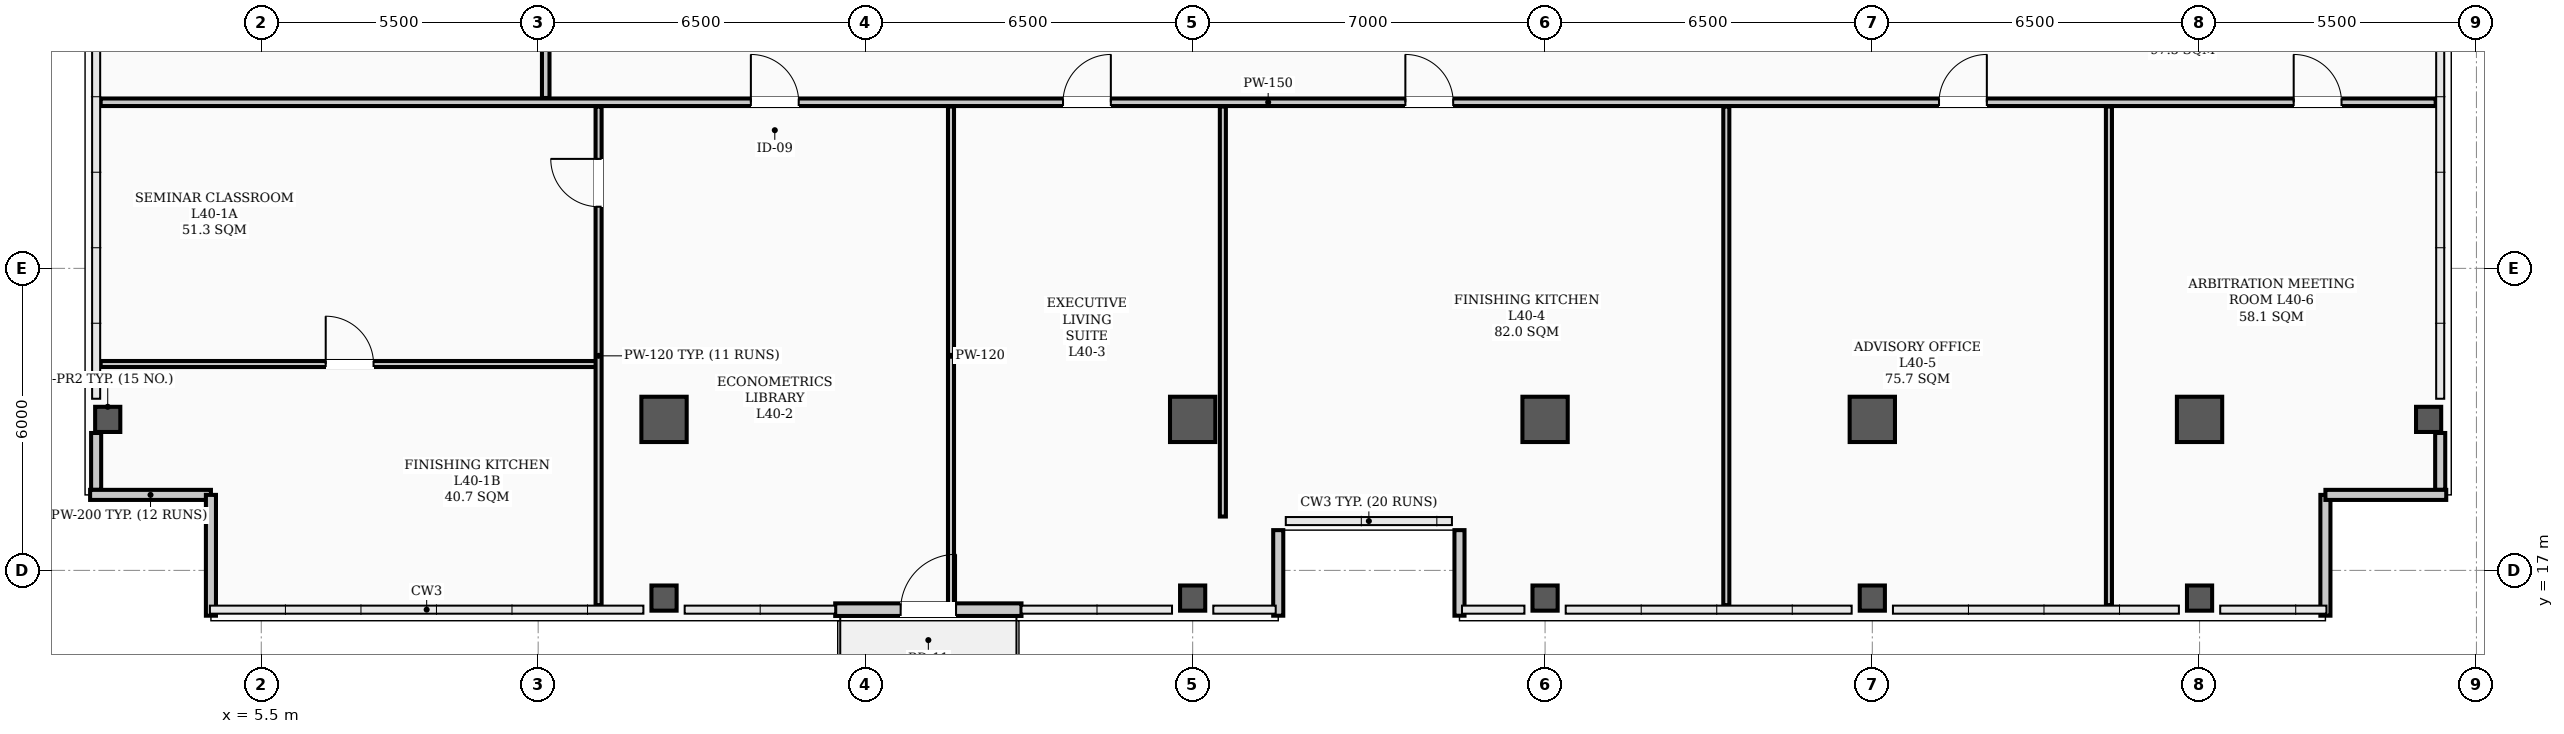
"""IFC4 building model, lengths in metres.
Left out: names, types, materials, properties, quantities, classifications, styles, units other than length and angle.
Written with IfcOpenShell. Run it as: python <this file> out.ifc"""

import sys

from ifc_helpers import new_model, si_unit, direction, frame, frame_2d, origin, origin_2d, place, context, subcontext, project, spatial, rectangle, hollow_rectangle, extrude, element, fill, save


model = new_model("IFC4")
c1 = context("Model", 3, precision=1e-05, world=origin(), true_north=direction((0.0, 1.0)))
c2 = subcontext(c1, "Body", "Model", "MODEL_VIEW")
j1 = project(units=[si_unit("LENGTHUNIT", "METRE"), si_unit("PLANEANGLEUNIT", "RADIAN")], contexts=[c1])
p1 = place(None, origin())
s1 = spatial("IfcSite", under=j1, at=p1, CompositionType="ELEMENT")
p2 = place(p1, origin())
s2 = spatial("IfcBuilding", under=s1, at=p2, CompositionType="ELEMENT")
p3 = place(p2, frame((0.0, 0.0, 161.7)))
s3 = spatial("IfcBuildingStorey", under=s2, at=p3, CompositionType="ELEMENT", Elevation=161.7)
for number, where, z_axis, x_axis in (
    (1, (13.5, 20.0, 0.0), (0.0, 0.0, 1.0), (1.0, 0.0, 0.0)),
    (2, (24.0, 20.0, 0.0), (0.0, 0.0, 1.0), (1.0, 0.0, 0.0)),
    (3, (31.0, 20.0, 0.0), (0.0, 0.0, 1.0), (1.0, 0.0, 0.0)),
    (4, (37.5, 20.0, 0.0), (0.0, 0.0, 1.0), (1.0, 0.0, 0.0)),
    (5, (44.0, 20.0, 0.0), (0.0, 0.0, 1.0), (1.0, 0.0, 0.0)),
):
    element("IfcColumn", number, at=place(p3, frame(where, z_axis=z_axis, x_axis=x_axis)), inside=s3, PredefinedType="COLUMN", context=c2, shape_type="SweptSolid", body=[
        extrude(hollow_rectangle(XDim=0.9, YDim=0.9, WallThickness=0.035, InnerFilletRadius=0.017, OuterFilletRadius=0.052, at=origin_2d()), origin(), (0.0, 0.0, 1.0), 3.9),
    ])
for number, where, z_axis, x_axis in (
    (6, (2.45, 20.0, 0.0), (0.0, 0.0, 1.0), (1.0, 0.0, 0.0)),
    (7, (13.5, 16.45, 0.0), (0.0, 0.0, 1.0), (1.0, 0.0, 0.0)),
    (8, (24.0, 16.45, 0.0), (0.0, 0.0, 1.0), (1.0, 0.0, 0.0)),
    (9, (31.0, 16.45, 0.0), (0.0, 0.0, 1.0), (1.0, 0.0, 0.0)),
    (10, (37.5, 16.45, 0.0), (0.0, 0.0, 1.0), (1.0, 0.0, 0.0)),
    (11, (44.0, 16.45, 0.0), (0.0, 0.0, 1.0), (1.0, 0.0, 0.0)),
    (12, (48.55, 20.0, 0.0), (0.0, 0.0, 1.0), (1.0, 0.0, 0.0)),
):
    element("IfcColumn", number, at=place(p3, frame(where, z_axis=z_axis, x_axis=x_axis)), inside=s3, PredefinedType="COLUMN", context=c2, shape_type="SweptSolid", body=[
        extrude(hollow_rectangle(XDim=0.5, YDim=0.5, WallThickness=0.024, InnerFilletRadius=0.012, OuterFilletRadius=0.036, at=origin_2d()), origin(), (0.0, 0.0, 1.0), 3.9),
    ])
for number, where, z_axis, x_axis in (
    (13, (2.22, 18.6, 0.0), (0.0, 0.0, 1.0), (0.0, 1.0, 0.0)),
    (14, (48.78, 18.6, 0.0), (0.0, 0.0, 1.0), (0.0, 1.0, 0.0)),
):
    element("IfcWall", number, at=place(p3, frame(where, z_axis=z_axis, x_axis=x_axis)), inside=s3, PredefinedType="PARAPET", context=c2, shape_type="SweptSolid", body=[
        extrude(rectangle(XDim=1.13, YDim=0.2, at=frame_2d((0.565, 0.0))), origin(), (0.0, 0.0, 1.0), 1.2),
    ])
for number, where, z_axis, x_axis in (
    (15, (2.1, 18.5, 0.0), (0.0, 0.0, 1.0), (1.0, 0.0, 0.0)),
    (16, (4.5, 18.5, 0.0), (0.0, 0.0, 1.0), (0.0, -1.0, 0.0)),
    (17, (46.5, 16.1, 0.0), (0.0, 0.0, 1.0), (0.0, 1.0, 0.0)),
    (18, (46.5, 18.5, 0.0), (0.0, 0.0, 1.0), (1.0, 0.0, 0.0)),
):
    element("IfcWall", number, at=place(p3, frame(where, z_axis=z_axis, x_axis=x_axis)), inside=s3, PredefinedType="PARAPET", context=c2, shape_type="SweptSolid", body=[
        extrude(rectangle(XDim=2.4, YDim=0.2, at=frame_2d((1.2, 0.0))), origin(), (0.0, 0.0, 1.0), 1.2),
    ])
for number, where, z_axis, x_axis in (
    (19, (25.7, 16.1, 0.0), (0.0, 0.0, 1.0), (0.0, 1.0, 0.0)),
    (20, (29.3, 17.8, 0.0), (0.0, 0.0, 1.0), (0.0, -1.0, 0.0)),
):
    element("IfcWall", number, at=place(p3, frame(where, z_axis=z_axis, x_axis=x_axis)), inside=s3, PredefinedType="PARAPET", context=c2, shape_type="SweptSolid", body=[
        extrude(rectangle(XDim=1.7, YDim=0.2, at=frame_2d((0.85, 0.0))), origin(), (0.0, 0.0, 1.0), 1.2),
    ])
p4 = place(p3, frame((16.9, 16.22, 0.0), z_axis=(0.0, 0.0, 1.0), x_axis=(1.0, 0.0, 0.0)))
e21 = element("IfcWall", 21, at=p4, inside=s3, PredefinedType="STANDARD", context=c2, shape_type="SweptSolid", body=[
    extrude(rectangle(XDim=3.7, YDim=0.25, at=frame_2d((1.85, 0.0))), origin(), (0.0, 0.0, 1.0), 3.18),
])
p5 = place(p4, frame((1.3, 0.0, 0.0)))
e22 = element("IfcOpeningElement", 22, at=p5, cuts=e21, PredefinedType="OPENING", context=c2, shape_type="SweptSolid", body=[
    extrude(rectangle(XDim=1.1, YDim=2.2, at=frame_2d((0.55, 1.1))), frame((0.0, 0.135, 0.0), z_axis=(0.0, -1.0, 0.0), x_axis=(1.0, 0.0, 0.0)), (0.0, 0.0, 1.0), 0.27),
])
p6 = place(p3, frame((2.31, 26.3, 0.0), z_axis=(0.0, 0.0, 1.0), x_axis=(1.0, 0.0, 0.0)))
e23 = element("IfcWall", 23, at=p6, inside=s3, PredefinedType="PARTITIONING", context=c2, shape_type="SweptSolid", body=[
    extrude(rectangle(XDim=46.38, YDim=0.15, at=frame_2d((23.19, 0.0))), origin(), (0.0, 0.0, 1.0), 3.2),
])
p7 = place(p6, frame((12.915, 0.0, 0.0)))
e24 = element("IfcOpeningElement", 24, at=p7, cuts=e23, PredefinedType="OPENING", context=c2, shape_type="SweptSolid", body=[
    extrude(rectangle(XDim=0.95, YDim=2.08, at=frame_2d((0.475, 1.04))), frame((0.0, 0.085, 0.0), z_axis=(0.0, -1.0, 0.0), x_axis=(1.0, 0.0, 0.0)), (0.0, 0.0, 1.0), 0.17),
])
p8 = place(p6, frame((19.115, 0.0, 0.0)))
e25 = element("IfcOpeningElement", 25, at=p8, cuts=e23, PredefinedType="OPENING", context=c2, shape_type="SweptSolid", body=[
    extrude(rectangle(XDim=0.95, YDim=2.08, at=frame_2d((0.475, 1.04))), frame((0.0, 0.085, 0.0), z_axis=(0.0, -1.0, 0.0), x_axis=(1.0, 0.0, 0.0)), (0.0, 0.0, 1.0), 0.17),
])
p9 = place(p6, frame((25.915, 0.0, 0.0)))
e26 = element("IfcOpeningElement", 26, at=p9, cuts=e23, PredefinedType="OPENING", context=c2, shape_type="SweptSolid", body=[
    extrude(rectangle(XDim=0.95, YDim=2.08, at=frame_2d((0.475, 1.04))), frame((0.0, 0.085, 0.0), z_axis=(0.0, -1.0, 0.0), x_axis=(1.0, 0.0, 0.0)), (0.0, 0.0, 1.0), 0.17),
])
p10 = place(p6, frame((36.515, 0.0, 0.0)))
e27 = element("IfcOpeningElement", 27, at=p10, cuts=e23, PredefinedType="OPENING", context=c2, shape_type="SweptSolid", body=[
    extrude(rectangle(XDim=0.95, YDim=2.08, at=frame_2d((0.475, 1.04))), frame((0.0, 0.085, 0.0), z_axis=(0.0, -1.0, 0.0), x_axis=(1.0, 0.0, 0.0)), (0.0, 0.0, 1.0), 0.17),
])
p11 = place(p6, frame((43.56, 0.0, 0.0)))
e28 = element("IfcOpeningElement", 28, at=p11, cuts=e23, PredefinedType="OPENING", context=c2, shape_type="SweptSolid", body=[
    extrude(rectangle(XDim=0.95, YDim=2.08, at=frame_2d((0.475, 1.04))), frame((0.0, 0.085, 0.0), z_axis=(0.0, -1.0, 0.0), x_axis=(1.0, 0.0, 0.0)), (0.0, 0.0, 1.0), 0.17),
])
p12 = place(p3, frame((2.31, 21.1, 0.0), z_axis=(0.0, 0.0, 1.0), x_axis=(1.0, 0.0, 0.0)))
e29 = element("IfcWall", 29, at=p12, inside=s3, PredefinedType="PARTITIONING", context=c2, shape_type="SweptSolid", body=[
    extrude(rectangle(XDim=9.89, YDim=0.12, at=frame_2d((4.945, 0.0))), origin(), (0.0, 0.0, 1.0), 3.212),
])
p13 = place(p12, frame((4.47, 0.0, 0.0)))
e30 = element("IfcOpeningElement", 30, at=p13, cuts=e29, PredefinedType="OPENING", context=c2, shape_type="SweptSolid", body=[
    extrude(rectangle(XDim=0.95, YDim=2.08, at=frame_2d((0.475, 1.04))), frame((0.0, 0.07, 0.0), z_axis=(0.0, -1.0, 0.0), x_axis=(1.0, 0.0, 0.0)), (0.0, 0.0, 1.0), 0.14),
])
p14 = place(p3, frame((11.15, 26.385, 0.0), z_axis=(0.0, 0.0, 1.0), x_axis=(0.0, 1.0, 0.0)))
e31 = element("IfcWall", 31, at=p14, inside=s3, PredefinedType="PARTITIONING", context=c2, shape_type="SweptSolid", body=[
    extrude(rectangle(XDim=13.58, YDim=0.15, at=frame_2d((6.79, 0.0))), origin(), (0.0, 0.0, 1.0), 3.1),
])
p15 = place(p14, frame((6.315, 0.0, 0.0)))
e32 = element("IfcOpeningElement", 32, at=p15, cuts=e31, PredefinedType="OPENING", context=c2, shape_type="SweptSolid", body=[
    extrude(rectangle(XDim=0.95, YDim=2.08, at=frame_2d((0.475, 1.04))), frame((0.0, 0.085, 0.0), z_axis=(0.0, -1.0, 0.0), x_axis=(1.0, 0.0, 0.0)), (0.0, 0.0, 1.0), 0.17),
])
p16 = place(p3, frame((12.2, 16.31, 0.0), z_axis=(0.0, 0.0, 1.0), x_axis=(0.0, 1.0, 0.0)))
e33 = element("IfcWall", 33, at=p16, inside=s3, PredefinedType="PARTITIONING", context=c2, shape_type="SweptSolid", body=[
    extrude(rectangle(XDim=9.905, YDim=0.12, at=frame_2d((4.953, 0.0))), origin(), (0.0, 0.0, 1.0), 3.1),
])
p17 = place(p16, frame((7.915, 0.0, 0.0)))
e34 = element("IfcOpeningElement", 34, at=p17, cuts=e33, PredefinedType="OPENING", context=c2, shape_type="SweptSolid", body=[
    extrude(rectangle(XDim=0.95, YDim=2.08, at=frame_2d((0.475, 1.04))), frame((0.0, 0.07, 0.0), z_axis=(0.0, -1.0, 0.0), x_axis=(1.0, 0.0, 0.0)), (0.0, 0.0, 1.0), 0.14),
])
p18 = place(p3, frame((19.2, 16.31, 0.0), z_axis=(0.0, 0.0, 1.0), x_axis=(0.0, 1.0, 0.0)))
e35 = element("IfcWall", 35, at=p18, inside=s3, PredefinedType="PARTITIONING", context=c2, shape_type="SweptSolid", body=[
    extrude(rectangle(XDim=9.905, YDim=0.12, at=frame_2d((4.953, 0.0))), origin(), (0.0, 0.0, 1.0), 3.1),
])
p19 = place(p3, frame((24.6, 18.07, 0.0), z_axis=(0.0, 0.0, 1.0), x_axis=(0.0, 1.0, 0.0)))
e36 = element("IfcWall", 36, at=p19, inside=s3, PredefinedType="PARTITIONING", context=c2, shape_type="SweptSolid", body=[
    extrude(rectangle(XDim=8.145, YDim=0.12, at=frame_2d((4.073, 0.0))), origin(), (0.0, 0.0, 1.0), 3.1),
])
for number, where, z_axis, x_axis in (
    (37, (34.6, 16.31, 0.0), (0.0, 0.0, 1.0), (0.0, 1.0, 0.0)),
    (38, (42.2, 16.31, 0.0), (0.0, 0.0, 1.0), (0.0, 1.0, 0.0)),
):
    element("IfcWall", number, at=place(p3, frame(where, z_axis=z_axis, x_axis=x_axis)), inside=s3, PredefinedType="PARTITIONING", context=c2, shape_type="SweptSolid", body=[
        extrude(rectangle(XDim=9.905, YDim=0.12, at=frame_2d((4.953, 0.0))), origin(), (0.0, 0.0, 1.0), 3.1),
    ])
p20 = place(p5, origin())
e39 = element("IfcDoor", 39, at=p20, inside=s3, OperationType="SINGLE_SWING_RIGHT", PredefinedType="DOOR", context=c2, shape_type="SweptSolid", body=[
    extrude(rectangle(XDim=1.1, YDim=2.2, at=frame_2d((0.55, 1.1))), frame((0.0, 0.025, 0.0), z_axis=(0.0, -1.0, 0.0), x_axis=(1.0, 0.0, 0.0)), (0.0, 0.0, 1.0), 0.05),
])
fill(e22, e39)
p21 = place(p13, origin())
e40 = element("IfcDoor", 40, at=p21, inside=s3, OperationType="SINGLE_SWING_LEFT", PredefinedType="DOOR", context=c2, shape_type="SweptSolid", body=[
    extrude(rectangle(XDim=0.95, YDim=2.08, at=frame_2d((0.475, 1.04))), frame((0.0, 0.025, 0.0), z_axis=(0.0, -1.0, 0.0), x_axis=(1.0, 0.0, 0.0)), (0.0, 0.0, 1.0), 0.05),
])
fill(e30, e40)
p22 = place(p17, origin())
e41 = element("IfcDoor", 41, at=p22, inside=s3, OperationType="SINGLE_SWING_RIGHT", PredefinedType="DOOR", context=c2, shape_type="SweptSolid", body=[
    extrude(rectangle(XDim=0.95, YDim=2.08, at=frame_2d((0.475, 1.04))), frame((0.0, 0.025, 0.0), z_axis=(0.0, -1.0, 0.0), x_axis=(1.0, 0.0, 0.0)), (0.0, 0.0, 1.0), 0.05),
])
fill(e34, e41)
p23 = place(p7, origin())
e42 = element("IfcDoor", 42, at=p23, inside=s3, OperationType="SINGLE_SWING_LEFT", PredefinedType="DOOR", context=c2, shape_type="SweptSolid", body=[
    extrude(rectangle(XDim=0.95, YDim=2.08, at=frame_2d((0.475, 1.04))), frame((0.0, 0.025, 0.0), z_axis=(0.0, -1.0, 0.0), x_axis=(1.0, 0.0, 0.0)), (0.0, 0.0, 1.0), 0.05),
])
fill(e24, e42)
p24 = place(p8, origin())
e43 = element("IfcDoor", 43, at=p24, inside=s3, OperationType="SINGLE_SWING_RIGHT", PredefinedType="DOOR", context=c2, shape_type="SweptSolid", body=[
    extrude(rectangle(XDim=0.95, YDim=2.08, at=frame_2d((0.475, 1.04))), frame((0.0, 0.025, 0.0), z_axis=(0.0, -1.0, 0.0), x_axis=(1.0, 0.0, 0.0)), (0.0, 0.0, 1.0), 0.05),
])
fill(e25, e43)
p25 = place(p9, origin())
e44 = element("IfcDoor", 44, at=p25, inside=s3, OperationType="SINGLE_SWING_LEFT", PredefinedType="DOOR", context=c2, shape_type="SweptSolid", body=[
    extrude(rectangle(XDim=0.95, YDim=2.08, at=frame_2d((0.475, 1.04))), frame((0.0, 0.025, 0.0), z_axis=(0.0, -1.0, 0.0), x_axis=(1.0, 0.0, 0.0)), (0.0, 0.0, 1.0), 0.05),
])
fill(e26, e44)
p26 = place(p10, origin())
e45 = element("IfcDoor", 45, at=p26, inside=s3, OperationType="SINGLE_SWING_RIGHT", PredefinedType="DOOR", context=c2, shape_type="SweptSolid", body=[
    extrude(rectangle(XDim=0.95, YDim=2.08, at=frame_2d((0.475, 1.04))), frame((0.0, 0.025, 0.0), z_axis=(0.0, -1.0, 0.0), x_axis=(1.0, 0.0, 0.0)), (0.0, 0.0, 1.0), 0.05),
])
fill(e27, e45)
p27 = place(p11, origin())
e46 = element("IfcDoor", 46, at=p27, inside=s3, OperationType="SINGLE_SWING_LEFT", PredefinedType="DOOR", context=c2, shape_type="SweptSolid", body=[
    extrude(rectangle(XDim=0.95, YDim=2.08, at=frame_2d((0.475, 1.04))), frame((0.0, 0.025, 0.0), z_axis=(0.0, -1.0, 0.0), x_axis=(1.0, 0.0, 0.0)), (0.0, 0.0, 1.0), 0.05),
])
fill(e28, e46)
save(model, sys.argv[1])
